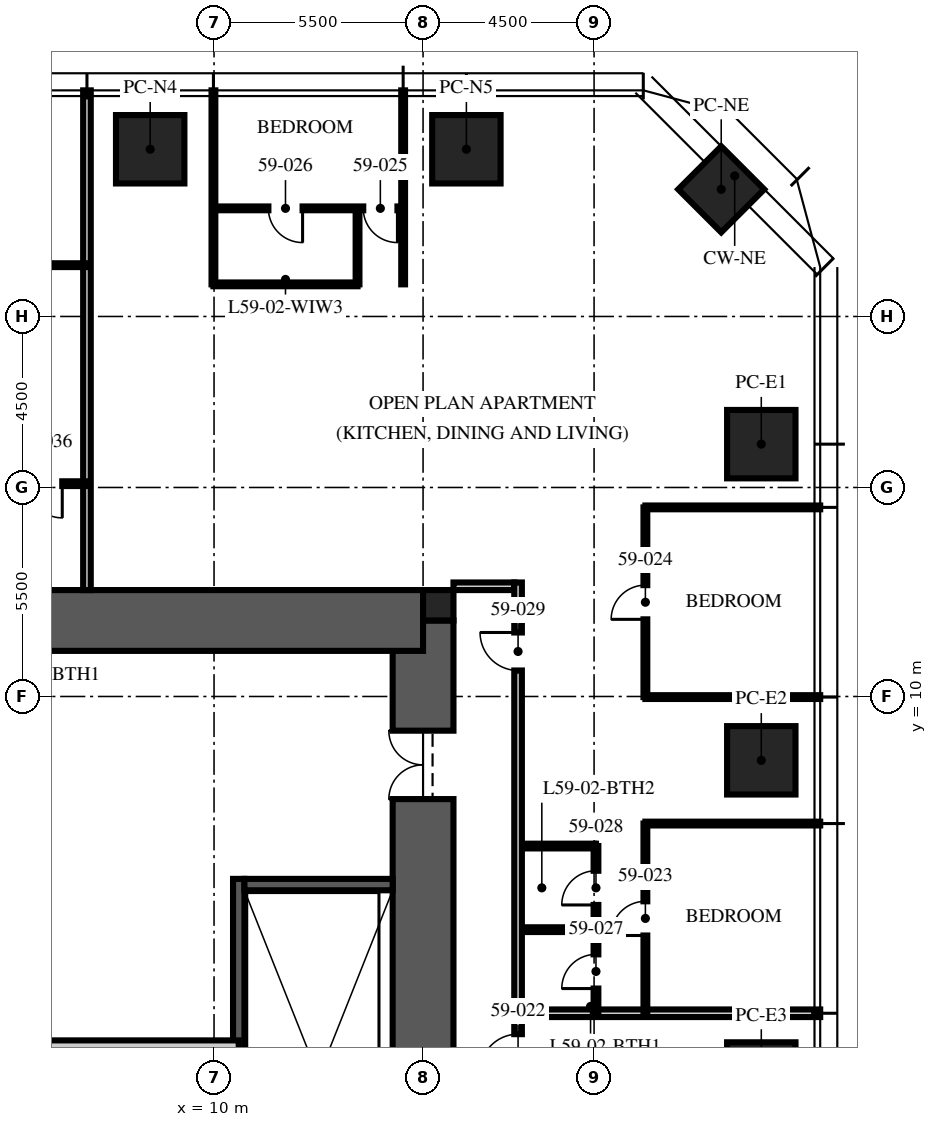
"""IFC4 building model, lengths in metres.
Left out: names, types, materials, properties, quantities, classifications, styles, units other than length and angle.
Written with IfcOpenShell. Run it as: python <this file> out.ifc"""

import sys

from ifc_helpers import new_model, si_unit, direction, frame, frame_2d, origin, origin_2d, place, context, subcontext, project, spatial, rectangle, extrude, element, fill, save


model = new_model("IFC4")
c1 = context("Model", 3, precision=1e-05, world=origin(), true_north=direction((0.0, 1.0)))
c2 = subcontext(c1, "Body", "Model", "MODEL_VIEW")
j1 = project(units=[si_unit("LENGTHUNIT", "METRE"), si_unit("PLANEANGLEUNIT", "RADIAN")], contexts=[c1])
p1 = place(None, origin())
s1 = spatial("IfcSite", under=j1, at=p1, CompositionType="ELEMENT")
p2 = place(p1, origin())
s2 = spatial("IfcBuilding", under=s1, at=p2, CompositionType="ELEMENT")
p3 = place(p2, frame((0.0, 0.0, 237.0)))
s3 = spatial("IfcBuildingStorey", under=s2, at=p3, CompositionType="ELEMENT", Elevation=237.0)
p4 = place(p3, frame((15.5, -12.0, -0.25), z_axis=(0.0, 0.0, 1.0), x_axis=(0.0, 1.0, 0.0)))
e1 = element("IfcWall", 1, at=p4, inside=s3, PredefinedType="SHEAR", context=c2, shape_type="SweptSolid", body=[
    extrude(rectangle(XDim=24.0, YDim=1.6, at=frame_2d((12.0, 0.0))), origin(), (0.0, 0.0, 1.0), 3.75),
])
p5 = place(p4, frame((3.2, 0.0, 0.25)))
e2 = element("IfcOpeningElement", 2, at=p5, cuts=e1, PredefinedType="OPENING", context=c2, shape_type="SweptSolid", body=[
    extrude(rectangle(XDim=1.2, YDim=2.1, at=frame_2d((0.6, 1.05))), frame((0.0, 0.81, 0.0), z_axis=(0.0, -1.0, 0.0), x_axis=(1.0, 0.0, 0.0)), (0.0, 0.0, 1.0), 1.62),
])
p6 = place(p4, frame((19.3, 0.0, 0.25)))
e3 = element("IfcOpeningElement", 3, at=p6, cuts=e1, PredefinedType="OPENING", context=c2, shape_type="SweptSolid", body=[
    extrude(rectangle(XDim=1.8, YDim=2.1, at=frame_2d((0.9, 1.05))), frame((0.0, 0.81, 0.0), z_axis=(0.0, -1.0, 0.0), x_axis=(1.0, 0.0, 0.0)), (0.0, 0.0, 1.0), 1.62),
])
p7 = place(p3, frame((-15.5, 12.0, -0.25), z_axis=(0.0, 0.0, 1.0), x_axis=(1.0, 0.0, 0.0)))
e4 = element("IfcWall", 4, at=p7, inside=s3, PredefinedType="SHEAR", context=c2, shape_type="SweptSolid", body=[
    extrude(rectangle(XDim=31.0, YDim=1.6, at=frame_2d((15.5, 0.0))), origin(), (0.0, 0.0, 1.0), 3.75),
])
p8 = place(p3, frame((15.9, 12.4, -0.25), z_axis=(0.0, 0.0, 1.0), x_axis=(1.0, 0.0, 0.0)))
e5 = element("IfcColumn", 5, at=p8, inside=s3, PredefinedType="COLUMN", context=c2, shape_type="SweptSolid", body=[
    extrude(rectangle(XDim=0.8, YDim=0.8, at=origin_2d()), origin(), (0.0, 0.0, 1.0), 3.75),
])
for number, where, z_axis, x_axis in (
    (6, (8.32, 24.4, 0.0), (0.0, 0.0, 1.0), (1.0, 0.0, 0.0)),
    (7, (16.64, 24.4, 0.0), (0.0, 0.0, 1.0), (1.0, 0.0, 0.0)),
    (8, (24.4, 16.64, 0.0), (0.0, 0.0, 1.0), (0.0, 1.0, 0.0)),
    (9, (24.4, 8.32, 0.0), (0.0, 0.0, 1.0), (0.0, 1.0, 0.0)),
    (10, (24.4, 0.0, 0.0), (0.0, 0.0, 1.0), (0.0, 1.0, 0.0)),
):
    element("IfcColumn", number, at=place(p3, frame(where, z_axis=z_axis, x_axis=x_axis)), inside=s3, PredefinedType="COLUMN", context=c2, shape_type="SweptSolid", body=[
        extrude(rectangle(XDim=1.8, YDim=1.8, at=origin_2d()), origin(), (0.0, 0.0, 1.0), 3.75),
    ])
p9 = place(p3, frame((23.346, 23.346, 0.0), z_axis=(0.0, 0.0, 1.0), x_axis=(0.707106781187, -0.707106781187, 0.0)))
e11 = element("IfcColumn", 11, at=p9, inside=s3, PredefinedType="COLUMN", context=c2, shape_type="SweptSolid", body=[
    extrude(rectangle(XDim=1.6, YDim=1.6, at=origin_2d()), origin(), (0.0, 0.0, 1.0), 3.75),
])
p10 = place(p3, frame((10.65, -4.9, 0.0), z_axis=(0.0, 0.0, 1.0), x_axis=(0.0, 1.0, 0.0)))
e12 = element("IfcWall", 12, at=p10, inside=s3, PredefinedType="SOLIDWALL", context=c2, shape_type="SweptSolid", body=[
    extrude(rectangle(XDim=10.1, YDim=0.3, at=frame_2d((5.05, 0.0))), origin(), (0.0, 0.0, 1.0), 3.5),
])
p11 = place(p3, frame((14.7, 5.05, 0.0), z_axis=(0.0, 0.0, 1.0), x_axis=(-1.0, 0.0, 0.0)))
e13 = element("IfcWall", 13, at=p11, inside=s3, PredefinedType="SOLIDWALL", context=c2, shape_type="SweptSolid", body=[
    extrude(rectangle(XDim=3.9, YDim=0.3, at=frame_2d((1.95, 0.0))), origin(), (0.0, 0.0, 1.0), 3.5),
])
p12 = place(p3, frame((-10.65, 0.8, 0.0), z_axis=(0.0, 0.0, 1.0), x_axis=(1.0, 0.0, 0.0)))
e14 = element("IfcWall", 14, at=p12, inside=s3, PredefinedType="PARTITIONING", context=c2, shape_type="SweptSolid", body=[
    extrude(rectangle(XDim=21.3, YDim=0.3, at=frame_2d((10.65, 0.0))), origin(), (0.0, 0.0, 1.0), 3.5),
])
p13 = place(p12, frame((10.05, 0.0, 0.0)))
e15 = element("IfcOpeningElement", 15, at=p13, cuts=e14, PredefinedType="OPENING", context=c2, shape_type="SweptSolid", body=[
    extrude(rectangle(XDim=1.2, YDim=2.1, at=frame_2d((0.6, 1.05))), frame((0.0, 0.16, 0.0), z_axis=(0.0, -1.0, 0.0), x_axis=(1.0, 0.0, 0.0)), (0.0, 0.0, 1.0), 0.32),
])
p14 = place(p12, frame((1.74, 0.0, 0.0)))
e16 = element("IfcOpeningElement", 16, at=p14, cuts=e14, PredefinedType="OPENING", context=c2, shape_type="SweptSolid", body=[
    extrude(rectangle(XDim=0.9, YDim=2.1, at=frame_2d((0.45, 1.05))), frame((0.0, 0.16, 0.0), z_axis=(0.0, -1.0, 0.0), x_axis=(1.0, 0.0, 0.0)), (0.0, 0.0, 1.0), 0.32),
])
p15 = place(p3, frame((16.3, 12.9, 0.0), z_axis=(0.0, 0.0, 1.0), x_axis=(1.0, 0.0, 0.0)))
e17 = element("IfcWall", 17, at=p15, inside=s3, PredefinedType="PARTITIONING", context=c2, shape_type="SweptSolid", body=[
    extrude(rectangle(XDim=1.6, YDim=0.2, at=frame_2d((0.8, 0.0))), origin(), (0.0, 0.0, 1.0), 2.3),
])
p16 = place(p3, frame((18.1, 1.664, 0.0), z_axis=(0.0, 0.0, 1.0), x_axis=(1.0, 0.0, 0.0)))
e18 = element("IfcWall", 18, at=p16, inside=s3, PredefinedType="PARTITIONING", context=c2, shape_type="SweptSolid", body=[
    extrude(rectangle(XDim=7.85, YDim=0.2, at=frame_2d((3.925, 0.0))), origin(), (0.0, 0.0, 1.0), 2.91),
])
for number, where, z_axis, x_axis in (
    (19, (21.35, 6.656, 0.0), (0.0, 0.0, 1.0), (1.0, 0.0, 0.0)),
    (20, (21.35, 9.984, 0.0), (0.0, 0.0, 1.0), (1.0, 0.0, 0.0)),
    (21, (21.35, 14.976, 0.0), (0.0, 0.0, 1.0), (1.0, 0.0, 0.0)),
):
    element("IfcWall", number, at=place(p3, frame(where, z_axis=z_axis, x_axis=x_axis)), inside=s3, PredefinedType="PARTITIONING", context=c2, shape_type="SweptSolid", body=[
        extrude(rectangle(XDim=4.6, YDim=0.1, at=frame_2d((2.3, 0.0))), origin(), (0.0, 0.0, 1.0), 2.91),
    ])
for number, where, z_axis, x_axis in (
    (22, (14.976, 20.845, 0.0), (0.0, 0.0, 1.0), (0.0, 1.0, 0.0)),
    (23, (9.984, 20.845, 0.0), (0.0, 0.0, 1.0), (0.0, 1.0, 0.0)),
):
    element("IfcWall", number, at=place(p3, frame(where, z_axis=z_axis, x_axis=x_axis)), inside=s3, PredefinedType="PARTITIONING", context=c2, shape_type="SweptSolid", body=[
        extrude(rectangle(XDim=5.105, YDim=0.1, at=frame_2d((2.552, 0.0))), origin(), (0.0, 0.0, 1.0), 2.91),
    ])
p17 = place(p3, frame((6.656, 12.8, 0.0), z_axis=(0.0, 0.0, 1.0), x_axis=(0.0, 1.0, 0.0)))
e24 = element("IfcWall", 24, at=p17, inside=s3, PredefinedType="PARTITIONING", context=c2, shape_type="SweptSolid", body=[
    extrude(rectangle(XDim=13.15, YDim=0.2, at=frame_2d((6.575, 0.0))), origin(), (0.0, 0.0, 1.0), 2.91),
])
p18 = place(p3, frame((21.35, 1.664, 0.0), z_axis=(0.0, 0.0, 1.0), x_axis=(0.0, 1.0, 0.0)))
e25 = element("IfcWall", 25, at=p18, inside=s3, PredefinedType="PARTITIONING", context=c2, shape_type="SweptSolid", body=[
    extrude(rectangle(XDim=4.992, YDim=0.1, at=frame_2d((2.496, 0.0))), origin(), (0.0, 0.0, 1.0), 2.81),
])
p19 = place(p18, frame((2.046, 0.0, 0.0)))
e26 = element("IfcOpeningElement", 26, at=p19, cuts=e25, PredefinedType="OPENING", context=c2, shape_type="SweptSolid", body=[
    extrude(rectangle(XDim=0.9, YDim=2.1, at=frame_2d((0.45, 1.05))), frame((0.0, 0.06, 0.0), z_axis=(0.0, -1.0, 0.0), x_axis=(1.0, 0.0, 0.0)), (0.0, 0.0, 1.0), 0.12),
])
p20 = place(p3, frame((21.35, 9.984, 0.0), z_axis=(0.0, 0.0, 1.0), x_axis=(0.0, 1.0, 0.0)))
e27 = element("IfcWall", 27, at=p20, inside=s3, PredefinedType="PARTITIONING", context=c2, shape_type="SweptSolid", body=[
    extrude(rectangle(XDim=4.992, YDim=0.1, at=frame_2d((2.496, 0.0))), origin(), (0.0, 0.0, 1.0), 2.81),
])
p21 = place(p20, frame((2.046, 0.0, 0.0)))
e28 = element("IfcOpeningElement", 28, at=p21, cuts=e27, PredefinedType="OPENING", context=c2, shape_type="SweptSolid", body=[
    extrude(rectangle(XDim=0.9, YDim=2.1, at=frame_2d((0.45, 1.05))), frame((0.0, 0.06, 0.0), z_axis=(0.0, -1.0, 0.0), x_axis=(1.0, 0.0, 0.0)), (0.0, 0.0, 1.0), 0.12),
])
p22 = place(p3, frame((14.976, 22.845, 0.0), z_axis=(0.0, 0.0, 1.0), x_axis=(-1.0, 0.0, 0.0)))
e29 = element("IfcWall", 29, at=p22, inside=s3, PredefinedType="PARTITIONING", context=c2, shape_type="SweptSolid", body=[
    extrude(rectangle(XDim=4.992, YDim=0.1, at=frame_2d((2.496, 0.0))), origin(), (0.0, 0.0, 1.0), 2.81),
])
p23 = place(p22, frame((0.15, 0.0, 0.0)))
e30 = element("IfcOpeningElement", 30, at=p23, cuts=e29, PredefinedType="OPENING", context=c2, shape_type="SweptSolid", body=[
    extrude(rectangle(XDim=0.9, YDim=2.1, at=frame_2d((0.45, 1.05))), frame((0.0, 0.06, 0.0), z_axis=(0.0, -1.0, 0.0), x_axis=(1.0, 0.0, 0.0)), (0.0, 0.0, 1.0), 0.12),
])
p24 = place(p22, frame((2.646, 0.0, 0.0)))
e31 = element("IfcOpeningElement", 31, at=p24, cuts=e29, PredefinedType="OPENING", context=c2, shape_type="SweptSolid", body=[
    extrude(rectangle(XDim=0.9, YDim=2.1, at=frame_2d((0.45, 1.05))), frame((0.0, 0.06, 0.0), z_axis=(0.0, -1.0, 0.0), x_axis=(1.0, 0.0, 0.0)), (0.0, 0.0, 1.0), 0.12),
])
p25 = place(p3, frame((13.776, 20.845, 0.0), z_axis=(0.0, 0.0, 1.0), x_axis=(0.0, 1.0, 0.0)))
e32 = element("IfcWall", 32, at=p25, inside=s3, PredefinedType="PARTITIONING", context=c2, shape_type="SweptSolid", body=[
    extrude(rectangle(XDim=2.0, YDim=0.1, at=frame_2d((1.0, 0.0))), origin(), (0.0, 0.0, 1.0), 3.5),
])
p26 = place(p3, frame((13.776, 20.845, 0.0), z_axis=(0.0, 0.0, 1.0), x_axis=(-1.0, 0.0, 0.0)))
e33 = element("IfcWall", 33, at=p26, inside=s3, PredefinedType="PARTITIONING", context=c2, shape_type="SweptSolid", body=[
    extrude(rectangle(XDim=3.792, YDim=0.1, at=frame_2d((1.896, 0.0))), origin(), (0.0, 0.0, 1.0), 2.81),
])
p27 = place(p3, frame((20.05, 1.664, 0.0), z_axis=(0.0, 0.0, 1.0), x_axis=(0.0, 1.0, 0.0)))
e34 = element("IfcWall", 34, at=p27, inside=s3, PredefinedType="PARTITIONING", context=c2, shape_type="SweptSolid", body=[
    extrude(rectangle(XDim=4.4, YDim=0.125, at=frame_2d((2.2, 0.0))), origin(), (0.0, 0.0, 1.0), 2.81),
])
p28 = place(p27, frame((0.65, 0.0, 0.0)))
e35 = element("IfcOpeningElement", 35, at=p28, cuts=e34, PredefinedType="OPENING", context=c2, shape_type="SweptSolid", body=[
    extrude(rectangle(XDim=0.9, YDim=2.1, at=frame_2d((0.45, 1.05))), frame((0.0, 0.073, 0.0), z_axis=(0.0, -1.0, 0.0), x_axis=(1.0, 0.0, 0.0)), (0.0, 0.0, 1.0), 0.145),
])
p29 = place(p27, frame((2.85, 0.0, 0.0)))
e36 = element("IfcOpeningElement", 36, at=p29, cuts=e34, PredefinedType="OPENING", context=c2, shape_type="SweptSolid", body=[
    extrude(rectangle(XDim=0.9, YDim=2.1, at=frame_2d((0.45, 1.05))), frame((0.0, 0.073, 0.0), z_axis=(0.0, -1.0, 0.0), x_axis=(1.0, 0.0, 0.0)), (0.0, 0.0, 1.0), 0.145),
])
for number, where, z_axis, x_axis in (
    (37, (18.1, 3.864, 0.0), (0.0, 0.0, 1.0), (1.0, 0.0, 0.0)),
    (38, (18.1, 6.064, 0.0), (0.0, 0.0, 1.0), (1.0, 0.0, 0.0)),
):
    element("IfcWall", number, at=place(p3, frame(where, z_axis=z_axis, x_axis=x_axis)), inside=s3, PredefinedType="PARTITIONING", context=c2, shape_type="SweptSolid", body=[
        extrude(rectangle(XDim=1.95, YDim=0.125, at=frame_2d((0.975, 0.0))), origin(), (0.0, 0.0, 1.0), 3.5),
    ])
p30 = place(p3, frame((6.656, 21.35, 0.0), z_axis=(0.0, 0.0, 1.0), x_axis=(-1.0, 0.0, 0.0)))
e39 = element("IfcWall", 39, at=p30, inside=s3, PredefinedType="PARTITIONING", context=c2, shape_type="SweptSolid", body=[
    extrude(rectangle(XDim=4.992, YDim=0.1, at=frame_2d((2.496, 0.0))), origin(), (0.0, 0.0, 1.0), 2.81),
])
p31 = place(p30, frame((2.046, 0.0, 0.0)))
e40 = element("IfcOpeningElement", 40, at=p31, cuts=e39, PredefinedType="OPENING", context=c2, shape_type="SweptSolid", body=[
    extrude(rectangle(XDim=0.9, YDim=2.1, at=frame_2d((0.45, 1.05))), frame((0.0, 0.06, 0.0), z_axis=(0.0, -1.0, 0.0), x_axis=(1.0, 0.0, 0.0)), (0.0, 0.0, 1.0), 0.12),
])
p32 = place(p3, frame((6.656, 15.6, 0.0), z_axis=(0.0, 0.0, 1.0), x_axis=(-1.0, 0.0, 0.0)))
e41 = element("IfcWall", 41, at=p32, inside=s3, PredefinedType="PARTITIONING", context=c2, shape_type="SweptSolid", body=[
    extrude(rectangle(XDim=4.0, YDim=0.125, at=frame_2d((2.0, 0.0))), origin(), (0.0, 0.0, 1.0), 2.81),
])
p33 = place(p32, frame((0.65, 0.0, 0.0)))
e42 = element("IfcOpeningElement", 42, at=p33, cuts=e41, PredefinedType="OPENING", context=c2, shape_type="SweptSolid", body=[
    extrude(rectangle(XDim=0.9, YDim=2.1, at=frame_2d((0.45, 1.05))), frame((0.0, 0.073, 0.0), z_axis=(0.0, -1.0, 0.0), x_axis=(1.0, 0.0, 0.0)), (0.0, 0.0, 1.0), 0.145),
])
p34 = place(p32, frame((2.65, 0.0, 0.0)))
e43 = element("IfcOpeningElement", 43, at=p34, cuts=e41, PredefinedType="OPENING", context=c2, shape_type="SweptSolid", body=[
    extrude(rectangle(XDim=0.9, YDim=2.1, at=frame_2d((0.45, 1.05))), frame((0.0, 0.073, 0.0), z_axis=(0.0, -1.0, 0.0), x_axis=(1.0, 0.0, 0.0)), (0.0, 0.0, 1.0), 0.145),
])
p35 = place(p3, frame((18.0, -12.8, 0.0), z_axis=(0.0, 0.0, 1.0), x_axis=(0.0, 1.0, 0.0)))
e44 = element("IfcWall", 44, at=p35, inside=s3, PredefinedType="PARTITIONING", context=c2, shape_type="SweptSolid", body=[
    extrude(rectangle(XDim=25.8, YDim=0.2, at=frame_2d((12.9, 0.0))), origin(), (0.0, 0.0, 1.0), 2.6),
])
p36 = place(p35, frame((12.914, 0.0, 0.0)))
e45 = element("IfcOpeningElement", 45, at=p36, cuts=e44, PredefinedType="OPENING", context=c2, shape_type="SweptSolid", body=[
    extrude(rectangle(XDim=1.0, YDim=2.2, at=frame_2d((0.5, 1.1))), frame((0.0, 0.11, 0.0), z_axis=(0.0, -1.0, 0.0), x_axis=(1.0, 0.0, 0.0)), (0.0, 0.0, 1.0), 0.22),
])
p37 = place(p35, frame((23.484, 0.0, 0.0)))
e46 = element("IfcOpeningElement", 46, at=p37, cuts=e44, PredefinedType="OPENING", context=c2, shape_type="SweptSolid", body=[
    extrude(rectangle(XDim=1.0, YDim=2.2, at=frame_2d((0.5, 1.1))), frame((0.0, 0.11, 0.0), z_axis=(0.0, -1.0, 0.0), x_axis=(1.0, 0.0, 0.0)), (0.0, 0.0, 1.0), 0.22),
])
p38 = place(p35, frame((4.4, 0.0, 0.0)))
e47 = element("IfcOpeningElement", 47, at=p38, cuts=e44, PredefinedType="OPENING", context=c2, shape_type="SweptSolid", body=[
    extrude(rectangle(XDim=1.0, YDim=2.2, at=frame_2d((0.5, 1.1))), frame((0.0, 0.11, 0.0), z_axis=(0.0, -1.0, 0.0), x_axis=(1.0, 0.0, 0.0)), (0.0, 0.0, 1.0), 0.22),
])
p39 = place(p6, origin())
e48 = element("IfcDoor", 48, at=p39, inside=s3, OperationType="DOUBLE_DOOR_SINGLE_SWING", PredefinedType="DOOR", context=c2, shape_type="SweptSolid", body=[
    extrude(rectangle(XDim=1.8, YDim=2.1, at=frame_2d((0.9, 1.05))), frame((0.0, 0.025, 0.0), z_axis=(0.0, -1.0, 0.0), x_axis=(1.0, 0.0, 0.0)), (0.0, 0.0, 1.0), 0.05),
])
fill(e3, e48)
p40 = place(p36, origin())
e49 = element("IfcDoor", 49, at=p40, inside=s3, OperationType="SINGLE_SWING_LEFT", PredefinedType="DOOR", context=c2, shape_type="SweptSolid", body=[
    extrude(rectangle(XDim=1.0, YDim=2.2, at=frame_2d((0.5, 1.1))), frame((0.0, 0.025, 0.0), z_axis=(0.0, -1.0, 0.0), x_axis=(1.0, 0.0, 0.0)), (0.0, 0.0, 1.0), 0.05),
])
fill(e45, e49)
p41 = place(p19, origin())
e50 = element("IfcDoor", 50, at=p41, inside=s3, OperationType="SINGLE_SWING_LEFT", PredefinedType="DOOR", context=c2, shape_type="SweptSolid", body=[
    extrude(rectangle(XDim=0.9, YDim=2.1, at=frame_2d((0.45, 1.05))), frame((0.0, 0.025, 0.0), z_axis=(0.0, -1.0, 0.0), x_axis=(1.0, 0.0, 0.0)), (0.0, 0.0, 1.0), 0.05),
])
fill(e26, e50)
p42 = place(p21, origin())
e51 = element("IfcDoor", 51, at=p42, inside=s3, OperationType="SINGLE_SWING_LEFT", PredefinedType="DOOR", context=c2, shape_type="SweptSolid", body=[
    extrude(rectangle(XDim=0.9, YDim=2.1, at=frame_2d((0.45, 1.05))), frame((0.0, 0.025, 0.0), z_axis=(0.0, -1.0, 0.0), x_axis=(1.0, 0.0, 0.0)), (0.0, 0.0, 1.0), 0.05),
])
fill(e28, e51)
p43 = place(p23, origin())
e52 = element("IfcDoor", 52, at=p43, inside=s3, OperationType="SINGLE_SWING_LEFT", PredefinedType="DOOR", context=c2, shape_type="SweptSolid", body=[
    extrude(rectangle(XDim=0.9, YDim=2.1, at=frame_2d((0.45, 1.05))), frame((0.0, 0.025, 0.0), z_axis=(0.0, -1.0, 0.0), x_axis=(1.0, 0.0, 0.0)), (0.0, 0.0, 1.0), 0.05),
])
fill(e30, e52)
p44 = place(p24, origin())
e53 = element("IfcDoor", 53, at=p44, inside=s3, OperationType="SINGLE_SWING_LEFT", PredefinedType="DOOR", context=c2, shape_type="SweptSolid", body=[
    extrude(rectangle(XDim=0.9, YDim=2.1, at=frame_2d((0.45, 1.05))), frame((0.0, 0.025, 0.0), z_axis=(0.0, -1.0, 0.0), x_axis=(1.0, 0.0, 0.0)), (0.0, 0.0, 1.0), 0.05),
])
fill(e31, e53)
p45 = place(p28, origin())
e54 = element("IfcDoor", 54, at=p45, inside=s3, OperationType="SINGLE_SWING_LEFT", PredefinedType="DOOR", context=c2, shape_type="SweptSolid", body=[
    extrude(rectangle(XDim=0.9, YDim=2.1, at=frame_2d((0.45, 1.05))), frame((0.0, 0.025, 0.0), z_axis=(0.0, -1.0, 0.0), x_axis=(1.0, 0.0, 0.0)), (0.0, 0.0, 1.0), 0.05),
])
fill(e35, e54)
p46 = place(p29, origin())
e55 = element("IfcDoor", 55, at=p46, inside=s3, OperationType="SINGLE_SWING_LEFT", PredefinedType="DOOR", context=c2, shape_type="SweptSolid", body=[
    extrude(rectangle(XDim=0.9, YDim=2.1, at=frame_2d((0.45, 1.05))), frame((0.0, 0.025, 0.0), z_axis=(0.0, -1.0, 0.0), x_axis=(1.0, 0.0, 0.0)), (0.0, 0.0, 1.0), 0.05),
])
fill(e36, e55)
p47 = place(p37, origin())
e56 = element("IfcDoor", 56, at=p47, inside=s3, OperationType="SINGLE_SWING_RIGHT", PredefinedType="DOOR", context=c2, shape_type="SweptSolid", body=[
    extrude(rectangle(XDim=1.0, YDim=2.2, at=frame_2d((0.5, 1.1))), frame((0.0, 0.025, 0.0), z_axis=(0.0, -1.0, 0.0), x_axis=(1.0, 0.0, 0.0)), (0.0, 0.0, 1.0), 0.05),
])
fill(e46, e56)
p48 = place(p33, origin())
e57 = element("IfcDoor", 57, at=p48, inside=s3, OperationType="SINGLE_SWING_LEFT", PredefinedType="DOOR", context=c2, shape_type="SweptSolid", body=[
    extrude(rectangle(XDim=0.9, YDim=2.1, at=frame_2d((0.45, 1.05))), frame((0.0, 0.025, 0.0), z_axis=(0.0, -1.0, 0.0), x_axis=(1.0, 0.0, 0.0)), (0.0, 0.0, 1.0), 0.05),
])
fill(e42, e57)
save(model, sys.argv[1])
